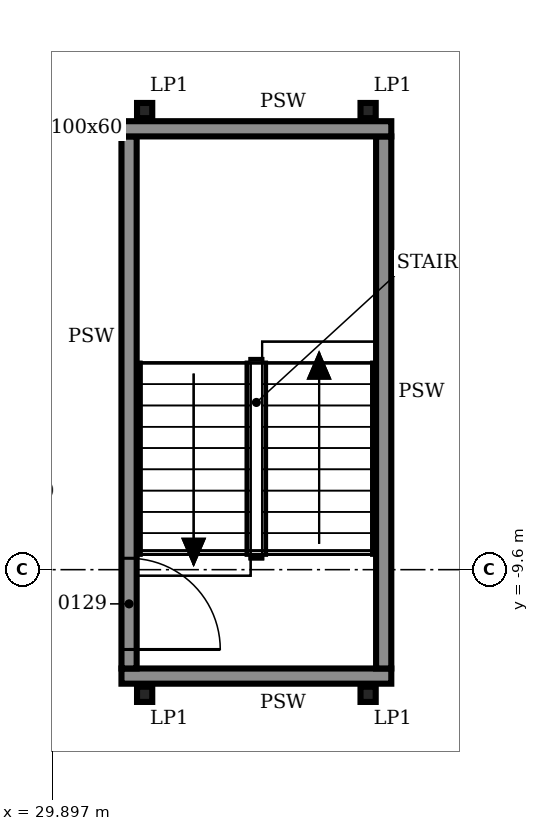
"""IFC4 building model, lengths in metres.
Left out: names, types, materials, properties, quantities, classifications, styles, units other than length and angle.
Written with IfcOpenShell. Run it as: python <this file> out.ifc"""

import sys

from ifc_helpers import new_model, si_unit, direction, frame, frame_2d, origin, origin_2d, place, context, subcontext, project, spatial, rectangle, i_section, extrude, element, fill, save


model = new_model("IFC4")
c1 = context("Model", 3, precision=1e-05, world=origin(), true_north=direction((0.0, 1.0)))
c2 = subcontext(c1, "Body", "Model", "MODEL_VIEW")
j1 = project(units=[si_unit("LENGTHUNIT", "METRE"), si_unit("PLANEANGLEUNIT", "RADIAN")], contexts=[c1])
p1 = place(None, origin())
s1 = spatial("IfcSite", under=j1, at=p1, CompositionType="ELEMENT")
p2 = place(p1, origin())
s2 = spatial("IfcBuilding", under=s1, at=p2, CompositionType="ELEMENT")
p3 = place(p2, frame((0.0, 0.0, 9.0)))
s3 = spatial("IfcBuildingStorey", under=s2, at=p3, CompositionType="ELEMENT", Elevation=9.0)
for number, where, z_axis, x_axis in (
    (1, (31.105, -3.56, 0.0), (0.0, 0.0, 1.0), (1.0, 0.0, 0.0)),
    (2, (34.045, -3.56, 0.0), (0.0, 0.0, 1.0), (1.0, 0.0, 0.0)),
    (3, (31.105, -11.24, 0.0), (0.0, 0.0, 1.0), (1.0, 0.0, 0.0)),
    (4, (34.045, -11.24, 0.0), (0.0, 0.0, 1.0), (1.0, 0.0, 0.0)),
):
    element("IfcColumn", number, at=place(p3, frame(where, z_axis=z_axis, x_axis=x_axis)), inside=s3, PredefinedType="COLUMN", context=c2, shape_type="SweptSolid", body=[
        extrude(i_section(OverallWidth=0.2, OverallDepth=0.2, WebThickness=0.009, FlangeThickness=0.015, FilletRadius=0.018, at=origin_2d()), origin(), (0.0, 0.0, 1.0), 6.0),
    ])
p4 = place(p3, frame((30.8, -11.0, 0.0), z_axis=(0.0, 0.0, 1.0), x_axis=(1.0, 0.0, 0.0)))
e5 = element("IfcWall", 5, at=p4, inside=s3, PredefinedType="SOLIDWALL", context=c2, shape_type="SweptSolid", body=[
    extrude(rectangle(XDim=3.55, YDim=0.2, at=frame_2d((1.775, 0.0))), origin(), (0.0, 0.0, 1.0), 5.8),
])
p5 = place(p3, frame((30.9, -10.9, 0.0), z_axis=(0.0, 0.0, 1.0), x_axis=(0.0, 1.0, 0.0)))
e6 = element("IfcWall", 6, at=p5, inside=s3, PredefinedType="SOLIDWALL", context=c2, shape_type="SweptSolid", body=[
    extrude(rectangle(XDim=7.0, YDim=0.2, at=frame_2d((3.5, 0.0))), origin(), (0.0, 0.0, 1.0), 5.8),
])
p6 = place(p5, frame((0.25, 0.0, 0.0)))
e7 = element("IfcOpeningElement", 7, at=p6, cuts=e6, PredefinedType="OPENING", context=c2, shape_type="SweptSolid", body=[
    extrude(rectangle(XDim=1.2, YDim=2.1, at=frame_2d((0.6, 1.05))), frame((0.0, 0.11, 0.0), z_axis=(0.0, -1.0, 0.0), x_axis=(1.0, 0.0, 0.0)), (0.0, 0.0, 1.0), 0.22),
])
p7 = place(p3, frame((34.25, -10.9, 0.0), z_axis=(0.0, 0.0, 1.0), x_axis=(0.0, 1.0, 0.0)))
e8 = element("IfcWall", 8, at=p7, inside=s3, PredefinedType="SOLIDWALL", context=c2, shape_type="SweptSolid", body=[
    extrude(rectangle(XDim=7.0, YDim=0.2, at=frame_2d((3.5, 0.0))), origin(), (0.0, 0.0, 1.0), 5.8),
])
p8 = place(p3, frame((30.8, -3.8, 0.0), z_axis=(0.0, 0.0, 1.0), x_axis=(1.0, 0.0, 0.0)))
e9 = element("IfcWall", 9, at=p8, inside=s3, PredefinedType="SOLIDWALL", context=c2, shape_type="SweptSolid", body=[
    extrude(rectangle(XDim=3.55, YDim=0.2, at=frame_2d((1.775, 0.0))), origin(), (0.0, 0.0, 1.0), 5.8),
])
p9 = place(p6, frame((1.2, 0.0, 0.0), z_axis=(0.0, 0.0, 1.0), x_axis=(-1.0, 0.0, 0.0)))
e10 = element("IfcDoor", 10, at=p9, inside=s3, OperationType="SINGLE_SWING_RIGHT", PredefinedType="DOOR", context=c2, shape_type="SweptSolid", body=[
    extrude(rectangle(XDim=1.2, YDim=2.1, at=frame_2d((0.6, 1.05))), frame((0.0, 0.025, 0.0), z_axis=(0.0, -1.0, 0.0), x_axis=(1.0, 0.0, 0.0)), (0.0, 0.0, 1.0), 0.05),
])
fill(e7, e10)
save(model, sys.argv[1])
